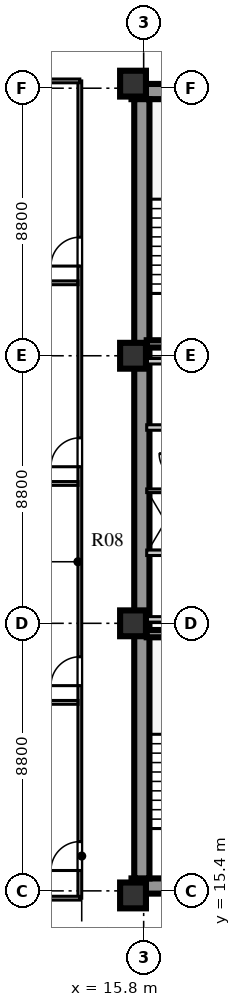
"""IFC4 building model, lengths in metres.
Left out: names, types, materials, properties, quantities, classifications, styles, units other than length and angle.
Written with IfcOpenShell. Run it as: python <this file> out.ifc"""

import sys

from ifc_helpers import new_model, si_unit, direction, frame, frame_2d, origin, origin_2d, place, context, subcontext, project, spatial, rectangle, extrude, element, fill, save


model = new_model("IFC4")
c1 = context("Model", 3, precision=1e-05, world=origin(), true_north=direction((0.0, 1.0)))
c2 = subcontext(c1, "Body", "Model", "MODEL_VIEW")
j1 = project(units=[si_unit("LENGTHUNIT", "METRE"), si_unit("PLANEANGLEUNIT", "RADIAN")], contexts=[c1])
p1 = place(None, origin())
s1 = spatial("IfcSite", under=j1, at=p1, CompositionType="ELEMENT")
p2 = place(p1, origin())
s2 = spatial("IfcBuilding", under=s1, at=p2, CompositionType="ELEMENT")
p3 = place(p2, frame((0.0, 0.0, 165.6)))
s3 = spatial("IfcBuildingStorey", under=s2, at=p3, CompositionType="ELEMENT", Elevation=165.6)
for number, where, z_axis, x_axis in (
    (1, (15.4, 15.56, 0.0), (0.0, 0.0, 1.0), (1.0, 0.0, 0.0)),
    (2, (15.4, 41.69, 0.0), (0.0, 0.0, 1.0), (1.0, 0.0, 0.0)),
):
    element("IfcWall", number, at=place(p3, frame(where, z_axis=z_axis, x_axis=x_axis)), inside=s3, PredefinedType="SHEAR", context=c2, shape_type="SweptSolid", body=[
        extrude(rectangle(XDim=9.68, YDim=0.5, at=frame_2d((4.84, 0.0))), origin(), (0.0, 0.0, 1.0), 3.6),
    ])
p4 = place(p3, frame((15.74, 15.81, 0.0), z_axis=(0.0, 0.0, 1.0), x_axis=(0.0, 1.0, 0.0)))
e3 = element("IfcWall", 3, at=p4, inside=s3, PredefinedType="SHEAR", context=c2, shape_type="SweptSolid", body=[
    extrude(rectangle(XDim=25.63, YDim=0.5, at=frame_2d((12.815, 0.0))), origin(), (0.0, 0.0, 1.0), 3.6),
])
for number, where, z_axis, x_axis in (
    (4, (15.45, 15.25, 0.0), (0.0, 0.0, 1.0), (1.0, 0.0, 0.0)),
    (5, (15.45, 24.2, 0.0), (0.0, 0.0, 1.0), (1.0, 0.0, 0.0)),
    (6, (15.45, 33.0, 0.0), (0.0, 0.0, 1.0), (1.0, 0.0, 0.0)),
    (7, (15.45, 41.95, 0.0), (0.0, 0.0, 1.0), (1.0, 0.0, 0.0)),
):
    element("IfcColumn", number, at=place(p3, frame(where, z_axis=z_axis, x_axis=x_axis)), inside=s3, PredefinedType="COLUMN", context=c2, shape_type="SweptSolid", body=[
        extrude(rectangle(XDim=0.85, YDim=0.85, at=origin_2d()), origin(), (0.0, 0.0, 1.0), 3.6),
    ])
p5 = place(p3, frame((15.9, 23.86, 0.0), z_axis=(0.0, 0.0, 1.0), x_axis=(1.0, 0.0, 0.0)))
e8 = element("IfcWall", 8, at=p5, inside=s3, PredefinedType="SHEAR", context=c2, shape_type="SweptSolid", body=[
    extrude(rectangle(XDim=3.52, YDim=0.24, at=frame_2d((1.76, 0.0))), origin(), (0.0, 0.0, 1.0), 3.85),
])
p6 = place(p3, frame((15.9, 26.52, 0.0), z_axis=(0.0, 0.0, 1.0), x_axis=(1.0, 0.0, 0.0)))
e9 = element("IfcWall", 9, at=p6, inside=s3, PredefinedType="SOLIDWALL", context=c2, shape_type="SweptSolid", body=[
    extrude(rectangle(XDim=8.68, YDim=0.18, at=frame_2d((4.34, 0.0))), origin(), (0.0, 0.0, 1.0), 3.6),
])
p7 = place(p6, frame((2.5, 0.0, 0.0)))
e10 = element("IfcOpeningElement", 10, at=p7, cuts=e9, PredefinedType="OPENING", context=c2, shape_type="SweptSolid", body=[
    extrude(rectangle(XDim=0.95, YDim=2.1, at=frame_2d((0.475, 1.05))), frame((0.0, 0.1, 0.0), z_axis=(0.0, -1.0, 0.0), x_axis=(1.0, 0.0, 0.0)), (0.0, 0.0, 1.0), 0.2),
])
p8 = place(p6, frame((6.0, 0.0, 0.0)))
e11 = element("IfcOpeningElement", 11, at=p8, cuts=e9, PredefinedType="OPENING", context=c2, shape_type="SweptSolid", body=[
    extrude(rectangle(XDim=0.95, YDim=2.1, at=frame_2d((0.475, 1.05))), frame((0.0, 0.1, 0.0), z_axis=(0.0, -1.0, 0.0), x_axis=(1.0, 0.0, 0.0)), (0.0, 0.0, 1.0), 0.2),
])
p9 = place(p3, frame((15.9, 24.33, 0.0), z_axis=(0.0, 0.0, 1.0), x_axis=(1.0, 0.0, 0.0)))
e12 = element("IfcWall", 12, at=p9, inside=s3, PredefinedType="SOLIDWALL", context=c2, shape_type="SweptSolid", body=[
    extrude(rectangle(XDim=8.68, YDim=0.18, at=frame_2d((4.34, 0.0))), origin(), (0.0, 0.0, 1.0), 2.95),
])
p10 = place(p3, frame((15.9, 28.56, 0.0), z_axis=(0.0, 0.0, 1.0), x_axis=(1.0, 0.0, 0.0)))
e13 = element("IfcWall", 13, at=p10, inside=s3, PredefinedType="PARTITIONING", context=c2, shape_type="SweptSolid", body=[
    extrude(rectangle(XDim=1.2, YDim=0.12, at=frame_2d((0.6, 0.0))), origin(), (0.0, 0.0, 1.0), 3.6),
])
p11 = place(p3, frame((15.9, 30.64, 0.0), z_axis=(0.0, 0.0, 1.0), x_axis=(1.0, 0.0, 0.0)))
e14 = element("IfcWall", 14, at=p11, inside=s3, PredefinedType="SOLIDWALL", context=c2, shape_type="SweptSolid", body=[
    extrude(rectangle(XDim=8.68, YDim=0.18, at=frame_2d((4.34, 0.0))), origin(), (0.0, 0.0, 1.0), 3.6),
])
p12 = place(p11, frame((1.76, 0.0, 0.0)))
e15 = element("IfcOpeningElement", 15, at=p12, cuts=e14, PredefinedType="OPENING", context=c2, shape_type="SweptSolid", body=[
    extrude(rectangle(XDim=1.0, YDim=2.1, at=frame_2d((0.5, 1.05))), frame((0.0, 0.1, 0.0), z_axis=(0.0, -1.0, 0.0), x_axis=(1.0, 0.0, 0.0)), (0.0, 0.0, 1.0), 0.2),
])
p13 = place(p11, frame((3.6, 0.0, 0.0)))
e16 = element("IfcOpeningElement", 16, at=p13, cuts=e14, PredefinedType="OPENING", context=c2, shape_type="SweptSolid", body=[
    extrude(rectangle(XDim=1.0, YDim=2.1, at=frame_2d((0.5, 1.05))), frame((0.0, 0.1, 0.0), z_axis=(0.0, -1.0, 0.0), x_axis=(1.0, 0.0, 0.0)), (0.0, 0.0, 1.0), 0.2),
])
p14 = place(p11, frame((5.44, 0.0, 0.0)))
e17 = element("IfcOpeningElement", 17, at=p14, cuts=e14, PredefinedType="OPENING", context=c2, shape_type="SweptSolid", body=[
    extrude(rectangle(XDim=1.0, YDim=2.1, at=frame_2d((0.5, 1.05))), frame((0.0, 0.1, 0.0), z_axis=(0.0, -1.0, 0.0), x_axis=(1.0, 0.0, 0.0)), (0.0, 0.0, 1.0), 0.2),
])
p15 = place(p11, frame((7.28, 0.0, 0.0)))
e18 = element("IfcOpeningElement", 18, at=p15, cuts=e14, PredefinedType="OPENING", context=c2, shape_type="SweptSolid", body=[
    extrude(rectangle(XDim=1.0, YDim=2.1, at=frame_2d((0.5, 1.05))), frame((0.0, 0.1, 0.0), z_axis=(0.0, -1.0, 0.0), x_axis=(1.0, 0.0, 0.0)), (0.0, 0.0, 1.0), 0.2),
])
p16 = place(p3, frame((15.9, 32.82, 0.0), z_axis=(0.0, 0.0, 1.0), x_axis=(1.0, 0.0, 0.0)))
e19 = element("IfcWall", 19, at=p16, inside=s3, PredefinedType="SOLIDWALL", context=c2, shape_type="SweptSolid", body=[
    extrude(rectangle(XDim=8.68, YDim=0.18, at=frame_2d((4.34, 0.0))), origin(), (0.0, 0.0, 1.0), 2.95),
])
p17 = place(p3, frame((15.9, 33.39, 0.0), z_axis=(0.0, 0.0, 1.0), x_axis=(1.0, 0.0, 0.0)))
e20 = element("IfcWall", 20, at=p17, inside=s3, PredefinedType="SHEAR", context=c2, shape_type="SweptSolid", body=[
    extrude(rectangle(XDim=3.52, YDim=0.24, at=frame_2d((1.76, 0.0))), origin(), (0.0, 0.0, 1.0), 3.85),
])
p18 = place(p3, frame((13.7, 15.16, 0.0), z_axis=(0.0, 0.0, 1.0), x_axis=(0.0, 1.0, 0.0)))
e21 = element("IfcWall", 21, at=p18, inside=s3, PredefinedType="PLUMBINGWALL", context=c2, shape_type="SweptSolid", body=[
    extrude(rectangle(XDim=26.88, YDim=0.125, at=frame_2d((13.44, 0.0))), origin(), (0.0, 0.0, 1.0), 3.6),
])
p19 = place(p18, frame((0.91, 0.0, 0.0)))
e22 = element("IfcOpeningElement", 22, at=p19, cuts=e21, PredefinedType="OPENING", context=c2, shape_type="SweptSolid", body=[
    extrude(rectangle(XDim=0.95, YDim=2.1, at=frame_2d((0.475, 1.05))), frame((0.0, 0.073, 0.0), z_axis=(0.0, -1.0, 0.0), x_axis=(1.0, 0.0, 0.0)), (0.0, 0.0, 1.0), 0.145),
])
p20 = place(p18, frame((6.99, 0.0, 0.0)))
e23 = element("IfcOpeningElement", 23, at=p20, cuts=e21, PredefinedType="OPENING", context=c2, shape_type="SweptSolid", body=[
    extrude(rectangle(XDim=0.95, YDim=2.1, at=frame_2d((0.475, 1.05))), frame((0.0, 0.073, 0.0), z_axis=(0.0, -1.0, 0.0), x_axis=(1.0, 0.0, 0.0)), (0.0, 0.0, 1.0), 0.145),
])
p21 = place(p18, frame((14.19, 0.0, 0.0)))
e24 = element("IfcOpeningElement", 24, at=p21, cuts=e21, PredefinedType="OPENING", context=c2, shape_type="SweptSolid", body=[
    extrude(rectangle(XDim=0.95, YDim=2.1, at=frame_2d((0.475, 1.05))), frame((0.0, 0.073, 0.0), z_axis=(0.0, -1.0, 0.0), x_axis=(1.0, 0.0, 0.0)), (0.0, 0.0, 1.0), 0.145),
])
p22 = place(p18, frame((20.79, 0.0, 0.0)))
e25 = element("IfcOpeningElement", 25, at=p22, cuts=e21, PredefinedType="OPENING", context=c2, shape_type="SweptSolid", body=[
    extrude(rectangle(XDim=0.95, YDim=2.1, at=frame_2d((0.475, 1.05))), frame((0.0, 0.073, 0.0), z_axis=(0.0, -1.0, 0.0), x_axis=(1.0, 0.0, 0.0)), (0.0, 0.0, 1.0), 0.145),
])
for number, where, z_axis, x_axis in (
    (26, (8.08, 15.16, 0.0), (0.0, 0.0, 1.0), (1.0, 0.0, 0.0)),
    (27, (8.08, 42.04, 0.0), (0.0, 0.0, 1.0), (1.0, 0.0, 0.0)),
):
    element("IfcWall", number, at=place(p3, frame(where, z_axis=z_axis, x_axis=x_axis)), inside=s3, PredefinedType="PLUMBINGWALL", context=c2, shape_type="SweptSolid", body=[
        extrude(rectangle(XDim=5.62, YDim=0.125, at=frame_2d((2.81, 0.0))), origin(), (0.0, 0.0, 1.0), 3.15),
    ])
for number, where, z_axis, x_axis in (
    (28, (8.08, 21.6, 0.0), (0.0, 0.0, 1.0), (1.0, 0.0, 0.0)),
    (29, (8.08, 28.8, 0.0), (0.0, 0.0, 1.0), (1.0, 0.0, 0.0)),
    (30, (8.08, 35.4, 0.0), (0.0, 0.0, 1.0), (1.0, 0.0, 0.0)),
):
    element("IfcWall", number, at=place(p3, frame(where, z_axis=z_axis, x_axis=x_axis)), inside=s3, PredefinedType="PLUMBINGWALL", context=c2, shape_type="SweptSolid", body=[
        extrude(rectangle(XDim=5.56, YDim=0.125, at=frame_2d((2.78, 0.0))), origin(), (0.0, 0.0, 1.0), 3.6),
    ])
p23 = place(p19, origin())
e31 = element("IfcDoor", 31, at=p23, inside=s3, OperationType="SINGLE_SWING_LEFT", PredefinedType="DOOR", context=c2, shape_type="SweptSolid", body=[
    extrude(rectangle(XDim=0.95, YDim=2.1, at=frame_2d((0.475, 1.05))), frame((0.0, 0.025, 0.0), z_axis=(0.0, -1.0, 0.0), x_axis=(1.0, 0.0, 0.0)), (0.0, 0.0, 1.0), 0.05),
])
fill(e22, e31)
p24 = place(p20, origin())
e32 = element("IfcDoor", 32, at=p24, inside=s3, OperationType="SINGLE_SWING_LEFT", PredefinedType="DOOR", context=c2, shape_type="SweptSolid", body=[
    extrude(rectangle(XDim=0.95, YDim=2.1, at=frame_2d((0.475, 1.05))), frame((0.0, 0.025, 0.0), z_axis=(0.0, -1.0, 0.0), x_axis=(1.0, 0.0, 0.0)), (0.0, 0.0, 1.0), 0.05),
])
fill(e23, e32)
p25 = place(p21, origin())
e33 = element("IfcDoor", 33, at=p25, inside=s3, OperationType="SINGLE_SWING_LEFT", PredefinedType="DOOR", context=c2, shape_type="SweptSolid", body=[
    extrude(rectangle(XDim=0.95, YDim=2.1, at=frame_2d((0.475, 1.05))), frame((0.0, 0.025, 0.0), z_axis=(0.0, -1.0, 0.0), x_axis=(1.0, 0.0, 0.0)), (0.0, 0.0, 1.0), 0.05),
])
fill(e24, e33)
p26 = place(p22, origin())
e34 = element("IfcDoor", 34, at=p26, inside=s3, OperationType="SINGLE_SWING_LEFT", PredefinedType="DOOR", context=c2, shape_type="SweptSolid", body=[
    extrude(rectangle(XDim=0.95, YDim=2.1, at=frame_2d((0.475, 1.05))), frame((0.0, 0.025, 0.0), z_axis=(0.0, -1.0, 0.0), x_axis=(1.0, 0.0, 0.0)), (0.0, 0.0, 1.0), 0.05),
])
fill(e25, e34)
save(model, sys.argv[1])
